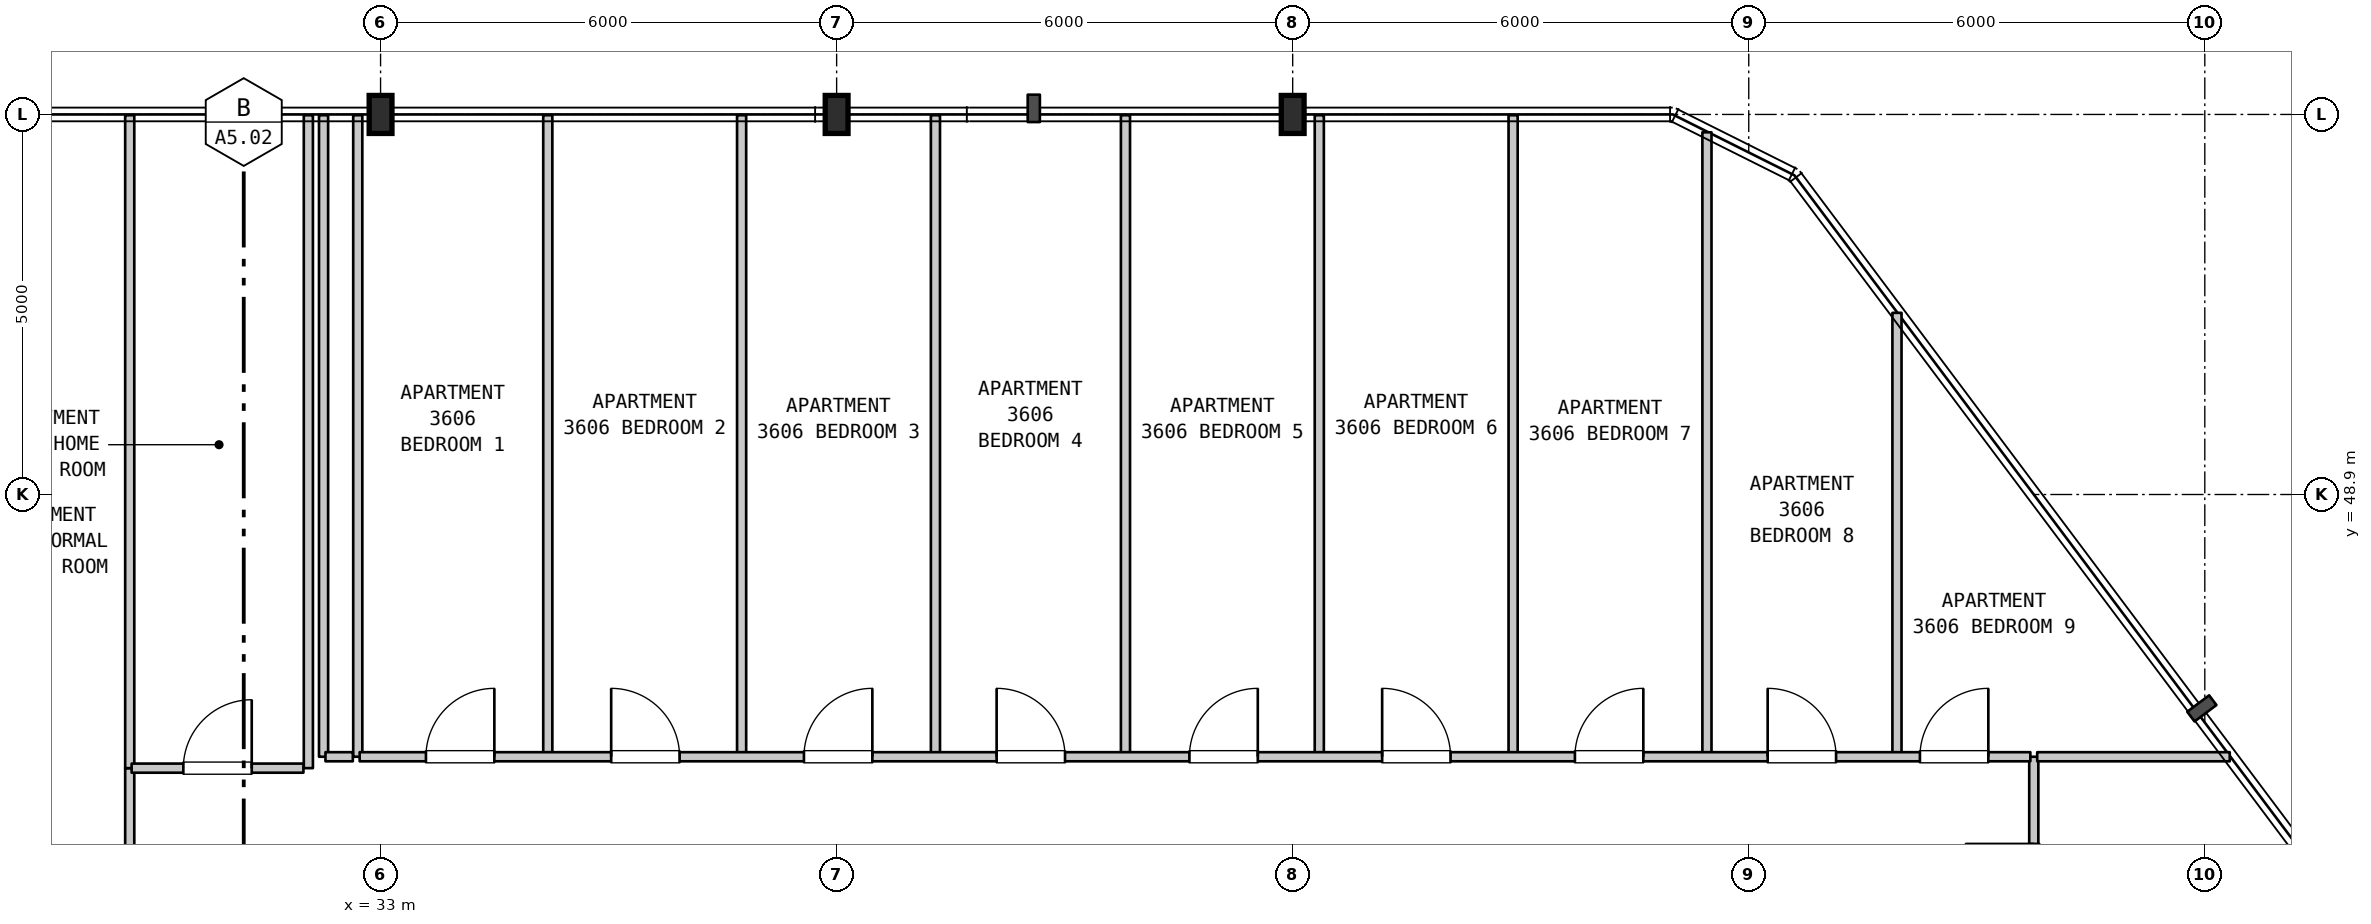
"""IFC4 building model, lengths in metres.
Left out: names, types, materials, properties, quantities, classifications, styles, units other than length and angle.
Written with IfcOpenShell. Run it as: python <this file> out.ifc"""

import sys

from ifc_helpers import new_model, si_unit, direction, frame, frame_2d, origin, origin_2d, place, context, subcontext, project, spatial, rectangle, i_section, extrude, element, fill, save


model = new_model("IFC4")
c1 = context("Model", 3, precision=1e-05, world=origin(), true_north=direction((0.0, 1.0)))
c2 = subcontext(c1, "Body", "Model", "MODEL_VIEW")
j1 = project(units=[si_unit("LENGTHUNIT", "METRE"), si_unit("PLANEANGLEUNIT", "RADIAN")], contexts=[c1])
p1 = place(None, origin())
s1 = spatial("IfcSite", under=j1, at=p1, CompositionType="ELEMENT")
p2 = place(p1, origin())
s2 = spatial("IfcBuilding", under=s1, at=p2, CompositionType="ELEMENT")
p3 = place(p2, frame((0.0, 0.0, 148.3)))
s3 = spatial("IfcBuildingStorey", under=s2, at=p3, CompositionType="ELEMENT", Elevation=148.3)
for number, where, z_axis, x_axis in (
    (1, (33.0, 53.9, 0.0), (0.0, 0.0, 1.0), (1.0, 0.0, 0.0)),
    (2, (39.0, 53.9, 0.0), (0.0, 0.0, 1.0), (1.0, 0.0, 0.0)),
    (3, (45.0, 53.9, 0.0), (0.0, 0.0, 1.0), (1.0, 0.0, 0.0)),
):
    element("IfcColumn", number, at=place(p3, frame(where, z_axis=z_axis, x_axis=x_axis)), inside=s3, PredefinedType="COLUMN", context=c2, shape_type="SweptSolid", body=[
        extrude(i_section(OverallWidth=0.3, OverallDepth=0.5, WebThickness=0.014, FlangeThickness=0.028, FilletRadius=0.027, at=origin_2d()), origin(), (0.0, 0.0, 1.0), 3.7),
    ])
p4 = place(p3, frame((29.7, 42.15, 0.0), z_axis=(0.0, 0.0, 1.0), x_axis=(0.0, 1.0, 0.0)))
e4 = element("IfcWall", 4, at=p4, inside=s3, PredefinedType="PARTITIONING", context=c2, shape_type="SweptSolid", body=[
    extrude(rectangle(XDim=3.15, YDim=0.12, at=frame_2d((1.575, 0.0))), origin(), (0.0, 0.0, 1.0), 3.385),
])
for number, where, z_axis, x_axis in (
    (5, (29.7, 45.3, 0.0), (0.0, 0.0, 1.0), (0.0, 1.0, 0.0)),
    (6, (32.05, 45.3, 0.0), (0.0, 0.0, 1.0), (0.0, 1.0, 0.0)),
):
    element("IfcWall", number, at=place(p3, frame(where, z_axis=z_axis, x_axis=x_axis)), inside=s3, PredefinedType="PARTITIONING", context=c2, shape_type="SweptSolid", body=[
        extrude(rectangle(XDim=8.59, YDim=0.12, at=frame_2d((4.295, 0.0))), origin(), (0.0, 0.0, 1.0), 3.385),
    ])
for number, where, z_axis, x_axis in (
    (7, (32.25, 45.45, 0.0), (0.0, 0.0, 1.0), (0.0, 1.0, 0.0)),
    (8, (32.7, 45.45, 0.0), (0.0, 0.0, 1.0), (0.0, 1.0, 0.0)),
    (9, (35.2, 45.45, 0.0), (0.0, 0.0, 1.0), (0.0, 1.0, 0.0)),
    (10, (37.75, 45.45, 0.0), (0.0, 0.0, 1.0), (0.0, 1.0, 0.0)),
    (11, (40.3, 45.45, 0.0), (0.0, 0.0, 1.0), (0.0, 1.0, 0.0)),
    (12, (42.8, 45.45, 0.0), (0.0, 0.0, 1.0), (0.0, 1.0, 0.0)),
    (13, (45.35, 45.45, 0.0), (0.0, 0.0, 1.0), (0.0, 1.0, 0.0)),
    (14, (47.9, 45.45, 0.0), (0.0, 0.0, 1.0), (0.0, 1.0, 0.0)),
):
    element("IfcWall", number, at=place(p3, frame(where, z_axis=z_axis, x_axis=x_axis)), inside=s3, PredefinedType="PARTITIONING", context=c2, shape_type="SweptSolid", body=[
        extrude(rectangle(XDim=8.44, YDim=0.12, at=frame_2d((4.22, 0.0))), origin(), (0.0, 0.0, 1.0), 3.385),
    ])
p5 = place(p3, frame((50.45, 45.45, 0.0), z_axis=(0.0, 0.0, 1.0), x_axis=(0.0, 1.0, 0.0)))
e15 = element("IfcWall", 15, at=p5, inside=s3, PredefinedType="PARTITIONING", context=c2, shape_type="SweptSolid", body=[
    extrude(rectangle(XDim=8.215, YDim=0.12, at=frame_2d((4.107, 0.0))), origin(), (0.0, 0.0, 1.0), 3.385),
])
p6 = place(p3, frame((52.95, 45.45, 0.0), z_axis=(0.0, 0.0, 1.0), x_axis=(0.0, 1.0, 0.0)))
e16 = element("IfcWall", 16, at=p6, inside=s3, PredefinedType="PARTITIONING", context=c2, shape_type="SweptSolid", body=[
    extrude(rectangle(XDim=5.84, YDim=0.12, at=frame_2d((2.92, 0.0))), origin(), (0.0, 0.0, 1.0), 3.385),
])
p7 = place(p3, frame((54.75, 42.4, 0.0), z_axis=(0.0, 0.0, 1.0), x_axis=(0.0, 1.0, 0.0)))
e17 = element("IfcWall", 17, at=p7, inside=s3, PredefinedType="PARTITIONING", context=c2, shape_type="SweptSolid", body=[
    extrude(rectangle(XDim=3.05, YDim=0.12, at=frame_2d((1.525, 0.0))), origin(), (0.0, 0.0, 1.0), 3.385),
])
p8 = place(p7, frame((1.003, 0.0, 0.0)))
e18 = element("IfcOpeningElement", 18, at=p8, cuts=e17, PredefinedType="OPENING", context=c2, shape_type="SweptSolid", body=[
    extrude(rectangle(XDim=0.9, YDim=2.15, at=frame_2d((0.45, 1.075))), frame((0.0, 0.07, 0.0), z_axis=(0.0, -1.0, 0.0), x_axis=(1.0, 0.0, 0.0)), (0.0, 0.0, 1.0), 0.14),
])
p9 = place(p3, frame((29.725, 45.3, 0.0), z_axis=(0.0, 0.0, 1.0), x_axis=(1.0, 0.0, 0.0)))
e19 = element("IfcWall", 19, at=p9, inside=s3, PredefinedType="PARTITIONING", context=c2, shape_type="SweptSolid", body=[
    extrude(rectangle(XDim=2.26, YDim=0.12, at=frame_2d((1.13, 0.0))), origin(), (0.0, 0.0, 1.0), 3.385),
])
p10 = place(p9, frame((0.68, 0.0, 0.0)))
e20 = element("IfcOpeningElement", 20, at=p10, cuts=e19, PredefinedType="OPENING", context=c2, shape_type="SweptSolid", body=[
    extrude(rectangle(XDim=0.9, YDim=2.15, at=frame_2d((0.45, 1.075))), frame((0.0, 0.07, 0.0), z_axis=(0.0, -1.0, 0.0), x_axis=(1.0, 0.0, 0.0)), (0.0, 0.0, 1.0), 0.14),
])
p11 = place(p3, frame((32.275, 45.45, 0.0), z_axis=(0.0, 0.0, 1.0), x_axis=(1.0, 0.0, 0.0)))
e21 = element("IfcWall", 21, at=p11, inside=s3, PredefinedType="PARTITIONING", context=c2, shape_type="SweptSolid", body=[
    extrude(rectangle(XDim=0.36, YDim=0.12, at=frame_2d((0.18, 0.0))), origin(), (0.0, 0.0, 1.0), 3.385),
])
p12 = place(p3, frame((32.725, 45.45, 0.0), z_axis=(0.0, 0.0, 1.0), x_axis=(1.0, 0.0, 0.0)))
e22 = element("IfcWall", 22, at=p12, inside=s3, PredefinedType="PARTITIONING", context=c2, shape_type="SweptSolid", body=[
    extrude(rectangle(XDim=21.98, YDim=0.12, at=frame_2d((10.99, 0.0))), origin(), (0.0, 0.0, 1.0), 3.385),
])
p13 = place(p12, frame((0.872, 0.0, 0.0)))
e23 = element("IfcOpeningElement", 23, at=p13, cuts=e22, PredefinedType="OPENING", context=c2, shape_type="SweptSolid", body=[
    extrude(rectangle(XDim=0.9, YDim=2.15, at=frame_2d((0.45, 1.075))), frame((0.0, 0.07, 0.0), z_axis=(0.0, -1.0, 0.0), x_axis=(1.0, 0.0, 0.0)), (0.0, 0.0, 1.0), 0.14),
])
p14 = place(p12, frame((3.309, 0.0, 0.0)))
e24 = element("IfcOpeningElement", 24, at=p14, cuts=e22, PredefinedType="OPENING", context=c2, shape_type="SweptSolid", body=[
    extrude(rectangle(XDim=0.9, YDim=2.15, at=frame_2d((0.45, 1.075))), frame((0.0, 0.07, 0.0), z_axis=(0.0, -1.0, 0.0), x_axis=(1.0, 0.0, 0.0)), (0.0, 0.0, 1.0), 0.14),
])
p15 = place(p12, frame((5.845, 0.0, 0.0)))
e25 = element("IfcOpeningElement", 25, at=p15, cuts=e22, PredefinedType="OPENING", context=c2, shape_type="SweptSolid", body=[
    extrude(rectangle(XDim=0.9, YDim=2.15, at=frame_2d((0.45, 1.075))), frame((0.0, 0.07, 0.0), z_axis=(0.0, -1.0, 0.0), x_axis=(1.0, 0.0, 0.0)), (0.0, 0.0, 1.0), 0.14),
])
p16 = place(p12, frame((8.38, 0.0, 0.0)))
e26 = element("IfcOpeningElement", 26, at=p16, cuts=e22, PredefinedType="OPENING", context=c2, shape_type="SweptSolid", body=[
    extrude(rectangle(XDim=0.9, YDim=2.15, at=frame_2d((0.45, 1.075))), frame((0.0, 0.07, 0.0), z_axis=(0.0, -1.0, 0.0), x_axis=(1.0, 0.0, 0.0)), (0.0, 0.0, 1.0), 0.14),
])
p17 = place(p12, frame((10.916, 0.0, 0.0)))
e27 = element("IfcOpeningElement", 27, at=p17, cuts=e22, PredefinedType="OPENING", context=c2, shape_type="SweptSolid", body=[
    extrude(rectangle(XDim=0.9, YDim=2.15, at=frame_2d((0.45, 1.075))), frame((0.0, 0.07, 0.0), z_axis=(0.0, -1.0, 0.0), x_axis=(1.0, 0.0, 0.0)), (0.0, 0.0, 1.0), 0.14),
])
p18 = place(p12, frame((13.452, 0.0, 0.0)))
e28 = element("IfcOpeningElement", 28, at=p18, cuts=e22, PredefinedType="OPENING", context=c2, shape_type="SweptSolid", body=[
    extrude(rectangle(XDim=0.9, YDim=2.15, at=frame_2d((0.45, 1.075))), frame((0.0, 0.07, 0.0), z_axis=(0.0, -1.0, 0.0), x_axis=(1.0, 0.0, 0.0)), (0.0, 0.0, 1.0), 0.14),
])
p19 = place(p12, frame((15.988, 0.0, 0.0)))
e29 = element("IfcOpeningElement", 29, at=p19, cuts=e22, PredefinedType="OPENING", context=c2, shape_type="SweptSolid", body=[
    extrude(rectangle(XDim=0.9, YDim=2.15, at=frame_2d((0.45, 1.075))), frame((0.0, 0.07, 0.0), z_axis=(0.0, -1.0, 0.0), x_axis=(1.0, 0.0, 0.0)), (0.0, 0.0, 1.0), 0.14),
])
p20 = place(p12, frame((18.524, 0.0, 0.0)))
e30 = element("IfcOpeningElement", 30, at=p20, cuts=e22, PredefinedType="OPENING", context=c2, shape_type="SweptSolid", body=[
    extrude(rectangle(XDim=0.9, YDim=2.15, at=frame_2d((0.45, 1.075))), frame((0.0, 0.07, 0.0), z_axis=(0.0, -1.0, 0.0), x_axis=(1.0, 0.0, 0.0)), (0.0, 0.0, 1.0), 0.14),
])
p21 = place(p12, frame((20.527, 0.0, 0.0)))
e31 = element("IfcOpeningElement", 31, at=p21, cuts=e22, PredefinedType="OPENING", context=c2, shape_type="SweptSolid", body=[
    extrude(rectangle(XDim=0.9, YDim=2.15, at=frame_2d((0.45, 1.075))), frame((0.0, 0.07, 0.0), z_axis=(0.0, -1.0, 0.0), x_axis=(1.0, 0.0, 0.0)), (0.0, 0.0, 1.0), 0.14),
])
p22 = place(p3, frame((54.795, 45.45, 0.0), z_axis=(0.0, 0.0, 1.0), x_axis=(1.0, 0.0, 0.0)))
e32 = element("IfcWall", 32, at=p22, inside=s3, PredefinedType="PARTITIONING", context=c2, shape_type="SweptSolid", body=[
    extrude(rectangle(XDim=2.533, YDim=0.12, at=frame_2d((1.267, 0.0))), origin(), (0.0, 0.0, 1.0), 3.385),
])
p23 = place(p8, origin())
e33 = element("IfcDoor", 33, at=p23, inside=s3, OperationType="SINGLE_SWING_RIGHT", PredefinedType="DOOR", context=c2, shape_type="SweptSolid", body=[
    extrude(rectangle(XDim=0.9, YDim=2.15, at=frame_2d((0.45, 1.075))), frame((0.0, 0.025, 0.0), z_axis=(0.0, -1.0, 0.0), x_axis=(1.0, 0.0, 0.0)), (0.0, 0.0, 1.0), 0.05),
])
fill(e18, e33)
p24 = place(p10, origin())
e34 = element("IfcDoor", 34, at=p24, inside=s3, OperationType="SINGLE_SWING_RIGHT", PredefinedType="DOOR", context=c2, shape_type="SweptSolid", body=[
    extrude(rectangle(XDim=0.9, YDim=2.15, at=frame_2d((0.45, 1.075))), frame((0.0, 0.025, 0.0), z_axis=(0.0, -1.0, 0.0), x_axis=(1.0, 0.0, 0.0)), (0.0, 0.0, 1.0), 0.05),
])
fill(e20, e34)
p25 = place(p13, origin())
e35 = element("IfcDoor", 35, at=p25, inside=s3, OperationType="SINGLE_SWING_RIGHT", PredefinedType="DOOR", context=c2, shape_type="SweptSolid", body=[
    extrude(rectangle(XDim=0.9, YDim=2.15, at=frame_2d((0.45, 1.075))), frame((0.0, 0.025, 0.0), z_axis=(0.0, -1.0, 0.0), x_axis=(1.0, 0.0, 0.0)), (0.0, 0.0, 1.0), 0.05),
])
fill(e23, e35)
p26 = place(p14, origin())
e36 = element("IfcDoor", 36, at=p26, inside=s3, OperationType="SINGLE_SWING_LEFT", PredefinedType="DOOR", context=c2, shape_type="SweptSolid", body=[
    extrude(rectangle(XDim=0.9, YDim=2.15, at=frame_2d((0.45, 1.075))), frame((0.0, 0.025, 0.0), z_axis=(0.0, -1.0, 0.0), x_axis=(1.0, 0.0, 0.0)), (0.0, 0.0, 1.0), 0.05),
])
fill(e24, e36)
p27 = place(p15, origin())
e37 = element("IfcDoor", 37, at=p27, inside=s3, OperationType="SINGLE_SWING_RIGHT", PredefinedType="DOOR", context=c2, shape_type="SweptSolid", body=[
    extrude(rectangle(XDim=0.9, YDim=2.15, at=frame_2d((0.45, 1.075))), frame((0.0, 0.025, 0.0), z_axis=(0.0, -1.0, 0.0), x_axis=(1.0, 0.0, 0.0)), (0.0, 0.0, 1.0), 0.05),
])
fill(e25, e37)
p28 = place(p16, origin())
e38 = element("IfcDoor", 38, at=p28, inside=s3, OperationType="SINGLE_SWING_LEFT", PredefinedType="DOOR", context=c2, shape_type="SweptSolid", body=[
    extrude(rectangle(XDim=0.9, YDim=2.15, at=frame_2d((0.45, 1.075))), frame((0.0, 0.025, 0.0), z_axis=(0.0, -1.0, 0.0), x_axis=(1.0, 0.0, 0.0)), (0.0, 0.0, 1.0), 0.05),
])
fill(e26, e38)
p29 = place(p17, origin())
e39 = element("IfcDoor", 39, at=p29, inside=s3, OperationType="SINGLE_SWING_RIGHT", PredefinedType="DOOR", context=c2, shape_type="SweptSolid", body=[
    extrude(rectangle(XDim=0.9, YDim=2.15, at=frame_2d((0.45, 1.075))), frame((0.0, 0.025, 0.0), z_axis=(0.0, -1.0, 0.0), x_axis=(1.0, 0.0, 0.0)), (0.0, 0.0, 1.0), 0.05),
])
fill(e27, e39)
p30 = place(p18, origin())
e40 = element("IfcDoor", 40, at=p30, inside=s3, OperationType="SINGLE_SWING_LEFT", PredefinedType="DOOR", context=c2, shape_type="SweptSolid", body=[
    extrude(rectangle(XDim=0.9, YDim=2.15, at=frame_2d((0.45, 1.075))), frame((0.0, 0.025, 0.0), z_axis=(0.0, -1.0, 0.0), x_axis=(1.0, 0.0, 0.0)), (0.0, 0.0, 1.0), 0.05),
])
fill(e28, e40)
p31 = place(p19, origin())
e41 = element("IfcDoor", 41, at=p31, inside=s3, OperationType="SINGLE_SWING_RIGHT", PredefinedType="DOOR", context=c2, shape_type="SweptSolid", body=[
    extrude(rectangle(XDim=0.9, YDim=2.15, at=frame_2d((0.45, 1.075))), frame((0.0, 0.025, 0.0), z_axis=(0.0, -1.0, 0.0), x_axis=(1.0, 0.0, 0.0)), (0.0, 0.0, 1.0), 0.05),
])
fill(e29, e41)
p32 = place(p20, origin())
e42 = element("IfcDoor", 42, at=p32, inside=s3, OperationType="SINGLE_SWING_LEFT", PredefinedType="DOOR", context=c2, shape_type="SweptSolid", body=[
    extrude(rectangle(XDim=0.9, YDim=2.15, at=frame_2d((0.45, 1.075))), frame((0.0, 0.025, 0.0), z_axis=(0.0, -1.0, 0.0), x_axis=(1.0, 0.0, 0.0)), (0.0, 0.0, 1.0), 0.05),
])
fill(e30, e42)
p33 = place(p21, origin())
e43 = element("IfcDoor", 43, at=p33, inside=s3, OperationType="SINGLE_SWING_RIGHT", PredefinedType="DOOR", context=c2, shape_type="SweptSolid", body=[
    extrude(rectangle(XDim=0.9, YDim=2.15, at=frame_2d((0.45, 1.075))), frame((0.0, 0.025, 0.0), z_axis=(0.0, -1.0, 0.0), x_axis=(1.0, 0.0, 0.0)), (0.0, 0.0, 1.0), 0.05),
])
fill(e31, e43)
save(model, sys.argv[1])
